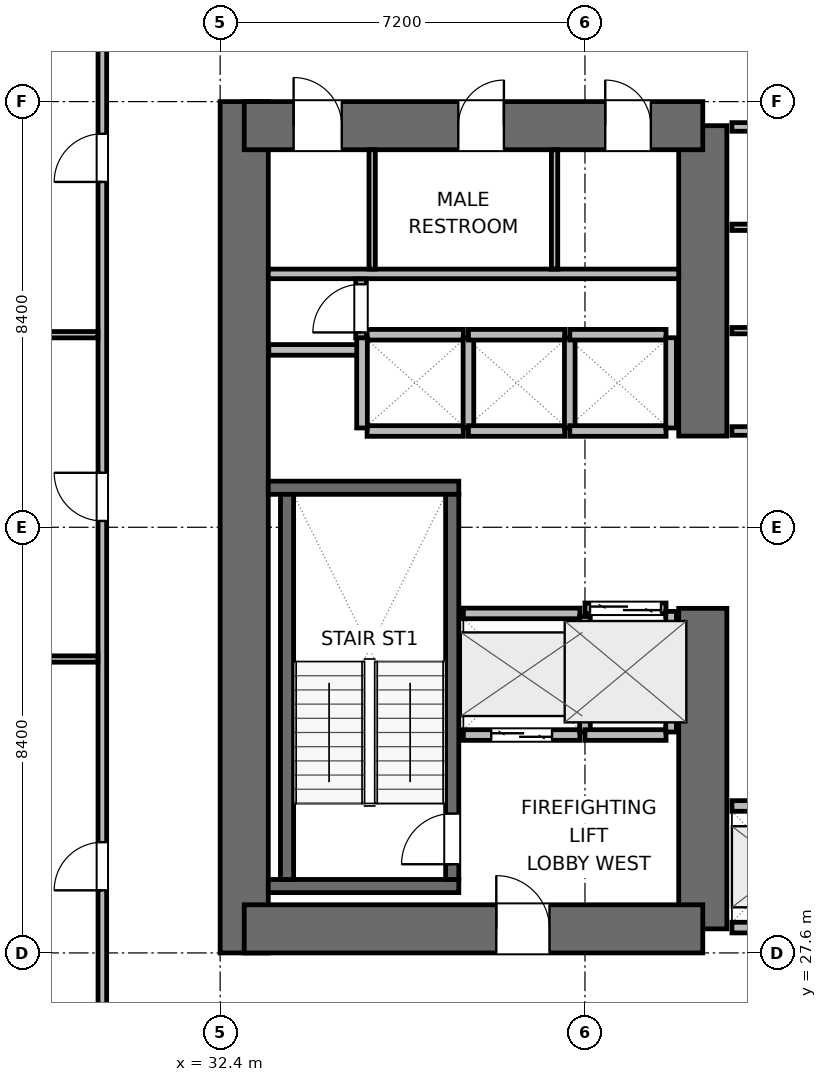
"""IFC4 building model, lengths in metres.
Left out: names, types, materials, properties, quantities, classifications, styles, units other than length and angle.
Written with IfcOpenShell. Run it as: python <this file> out.ifc"""

import sys

from ifc_helpers import new_model, si_unit, direction, frame, frame_2d, origin, place, context, subcontext, project, spatial, rectangle, extrude, element, fill, save


model = new_model("IFC4")
c1 = context("Model", 3, precision=1e-05, world=origin(), true_north=direction((0.0, 1.0)))
c2 = subcontext(c1, "Body", "Model", "MODEL_VIEW")
j1 = project(units=[si_unit("LENGTHUNIT", "METRE"), si_unit("PLANEANGLEUNIT", "RADIAN")], contexts=[c1])
p1 = place(None, origin())
s1 = spatial("IfcSite", under=j1, at=p1, CompositionType="ELEMENT")
p2 = place(p1, origin())
s2 = spatial("IfcBuilding", under=s1, at=p2, CompositionType="ELEMENT")
p3 = place(p2, frame((0.0, 0.0, 33.3)))
s3 = spatial("IfcBuildingStorey", under=s2, at=p3, CompositionType="ELEMENT", Elevation=33.3)
p4 = place(p3, frame((32.875, 27.6, 0.0), z_axis=(0.0, 0.0, 1.0), x_axis=(0.0, 1.0, 0.0)))
e1 = element("IfcWall", 1, at=p4, inside=s3, PredefinedType="SHEAR", context=c2, shape_type="SweptSolid", body=[
    extrude(rectangle(XDim=16.8, YDim=0.95, at=frame_2d((8.4, 0.0))), origin(), (0.0, 0.0, 1.0), 3.9),
])
p5 = place(p3, frame((41.925, 28.075, 0.0), z_axis=(0.0, 0.0, 1.0), x_axis=(0.0, 1.0, 0.0)))
e2 = element("IfcWall", 2, at=p5, inside=s3, PredefinedType="SHEAR", context=c2, shape_type="SweptSolid", body=[
    extrude(rectangle(XDim=6.325, YDim=0.95, at=frame_2d((3.163, 0.0))), origin(), (0.0, 0.0, 1.0), 3.9),
])
p6 = place(p3, frame((41.925, 37.8, 0.0), z_axis=(0.0, 0.0, 1.0), x_axis=(0.0, 1.0, 0.0)))
e3 = element("IfcWall", 3, at=p6, inside=s3, PredefinedType="SHEAR", context=c2, shape_type="SweptSolid", body=[
    extrude(rectangle(XDim=6.125, YDim=0.95, at=frame_2d((3.062, 0.0))), origin(), (0.0, 0.0, 1.0), 3.9),
])
p7 = place(p3, frame((32.875, 28.075, 0.0), z_axis=(0.0, 0.0, 1.0), x_axis=(1.0, 0.0, 0.0)))
e4 = element("IfcWall", 4, at=p7, inside=s3, PredefinedType="SHEAR", context=c2, shape_type="SweptSolid", body=[
    extrude(rectangle(XDim=9.05, YDim=0.95, at=frame_2d((4.525, 0.0))), origin(), (0.0, 0.0, 1.0), 3.9),
])
p8 = place(p7, frame((4.975, 0.0, 0.0)))
e5 = element("IfcOpeningElement", 5, at=p8, cuts=e4, PredefinedType="OPENING", context=c2, shape_type="SweptSolid", body=[
    extrude(rectangle(XDim=1.05, YDim=2.04, at=frame_2d((0.525, 1.02))), frame((0.0, 0.485, 0.0), z_axis=(0.0, -1.0, 0.0), x_axis=(1.0, 0.0, 0.0)), (0.0, 0.0, 1.0), 0.97),
])
p9 = place(p3, frame((32.875, 43.925, 0.0), z_axis=(0.0, 0.0, 1.0), x_axis=(1.0, 0.0, 0.0)))
e6 = element("IfcWall", 6, at=p9, inside=s3, PredefinedType="SHEAR", context=c2, shape_type="SweptSolid", body=[
    extrude(rectangle(XDim=9.05, YDim=0.95, at=frame_2d((4.525, 0.0))), origin(), (0.0, 0.0, 1.0), 3.9),
])
p10 = place(p9, frame((0.975, 0.0, 0.0)))
e7 = element("IfcOpeningElement", 7, at=p10, cuts=e6, PredefinedType="OPENING", context=c2, shape_type="SweptSolid", body=[
    extrude(rectangle(XDim=0.95, YDim=2.04, at=frame_2d((0.475, 1.02))), frame((0.0, 0.485, 0.0), z_axis=(0.0, -1.0, 0.0), x_axis=(1.0, 0.0, 0.0)), (0.0, 0.0, 1.0), 0.97),
])
p11 = place(p9, frame((4.225, 0.0, 0.0)))
e8 = element("IfcOpeningElement", 8, at=p11, cuts=e6, PredefinedType="OPENING", context=c2, shape_type="SweptSolid", body=[
    extrude(rectangle(XDim=0.9, YDim=2.02, at=frame_2d((0.45, 1.01))), frame((0.0, 0.485, 0.0), z_axis=(0.0, -1.0, 0.0), x_axis=(1.0, 0.0, 0.0)), (0.0, 0.0, 1.0), 0.97),
])
p12 = place(p9, frame((7.125, 0.0, 0.0)))
e9 = element("IfcOpeningElement", 9, at=p12, cuts=e6, PredefinedType="OPENING", context=c2, shape_type="SweptSolid", body=[
    extrude(rectangle(XDim=0.9, YDim=2.02, at=frame_2d((0.45, 1.01))), frame((0.0, 0.485, 0.0), z_axis=(0.0, -1.0, 0.0), x_axis=(1.0, 0.0, 0.0)), (0.0, 0.0, 1.0), 0.97),
])
for number, where, z_axis, x_axis in (
    (10, (33.35, 28.92, 0.0), (0.0, 0.0, 1.0), (1.0, 0.0, 0.0)),
    (11, (33.35, 36.78, 0.0), (0.0, 0.0, 1.0), (1.0, 0.0, 0.0)),
):
    element("IfcWall", number, at=place(p3, frame(where, z_axis=z_axis, x_axis=x_axis)), inside=s3, PredefinedType="SHEAR", context=c2, shape_type="SweptSolid", body=[
        extrude(rectangle(XDim=3.76, YDim=0.26, at=frame_2d((1.88, 0.0))), origin(), (0.0, 0.0, 1.0), 3.9),
    ])
p13 = place(p3, frame((33.72, 29.05, 0.0), z_axis=(0.0, 0.0, 1.0), x_axis=(0.0, 1.0, 0.0)))
e12 = element("IfcWall", 12, at=p13, inside=s3, PredefinedType="SHEAR", context=c2, shape_type="SweptSolid", body=[
    extrude(rectangle(XDim=7.6, YDim=0.26, at=frame_2d((3.8, 0.0))), origin(), (0.0, 0.0, 1.0), 3.9),
])
p14 = place(p3, frame((36.98, 29.05, 0.0), z_axis=(0.0, 0.0, 1.0), x_axis=(0.0, 1.0, 0.0)))
e13 = element("IfcWall", 13, at=p14, inside=s3, PredefinedType="SHEAR", context=c2, shape_type="SweptSolid", body=[
    extrude(rectangle(XDim=7.6, YDim=0.26, at=frame_2d((3.8, 0.0))), origin(), (0.0, 0.0, 1.0), 3.9),
])
p15 = place(p14, frame((0.3, 0.0, 0.0)))
e14 = element("IfcOpeningElement", 14, at=p15, cuts=e13, PredefinedType="OPENING", context=c2, shape_type="SweptSolid", body=[
    extrude(rectangle(XDim=1.0, YDim=2.04, at=frame_2d((0.5, 1.02))), frame((0.0, 0.14, 0.0), z_axis=(0.0, -1.0, 0.0), x_axis=(1.0, 0.0, 0.0)), (0.0, 0.0, 1.0), 0.28),
])
p16 = place(p3, frame((33.35, 41.0, 0.0), z_axis=(0.0, 0.0, 1.0), x_axis=(1.0, 0.0, 0.0)))
e15 = element("IfcWall", 15, at=p16, inside=s3, PredefinedType="PLUMBINGWALL", context=c2, shape_type="SweptSolid", body=[
    extrude(rectangle(XDim=8.1, YDim=0.19, at=frame_2d((4.05, 0.0))), origin(), (0.0, 0.0, 1.0), 3.64),
])
for number, where, z_axis, x_axis in (
    (16, (35.4, 41.095, 0.0), (0.0, 0.0, 1.0), (0.0, 1.0, 0.0)),
    (17, (39.0, 41.095, 0.0), (0.0, 0.0, 1.0), (0.0, 1.0, 0.0)),
):
    element("IfcWall", number, at=place(p3, frame(where, z_axis=z_axis, x_axis=x_axis)), inside=s3, PredefinedType="PARTITIONING", context=c2, shape_type="SweptSolid", body=[
        extrude(rectangle(XDim=2.355, YDim=0.125, at=frame_2d((1.177, 0.0))), origin(), (0.0, 0.0, 1.0), 3.64),
    ])
p17 = place(p3, frame((33.36, 39.5, 0.0), z_axis=(0.0, 0.0, 1.0), x_axis=(1.0, 0.0, 0.0)))
e18 = element("IfcWall", 18, at=p17, inside=s3, PredefinedType="PARTITIONING", context=c2, shape_type="SweptSolid", body=[
    extrude(rectangle(XDim=1.86, YDim=0.21, at=frame_2d((0.93, 0.0))), origin(), (0.0, 0.0, 1.0), 3.64),
])
p18 = place(p3, frame((37.2, 31.9, 0.0), z_axis=(0.0, 0.0, 1.0), x_axis=(1.0, 0.0, 0.0)))
e19 = element("IfcWall", 19, at=p18, inside=s3, PredefinedType="PARTITIONING", context=c2, shape_type="SweptSolid", body=[
    extrude(rectangle(XDim=2.3, YDim=0.21, at=frame_2d((1.15, 0.0))), origin(), (0.0, 0.0, 1.0), 3.64),
])
p19 = place(p18, frame((0.55, 0.0, 0.0)))
e20 = element("IfcOpeningElement", 20, at=p19, cuts=e19, PredefinedType="OPENING", context=c2, shape_type="SweptSolid", body=[
    extrude(rectangle(XDim=1.2, YDim=2.04, at=frame_2d((0.6, 1.02))), frame((0.0, 0.115, 0.0), z_axis=(0.0, -1.0, 0.0), x_axis=(1.0, 0.0, 0.0)), (0.0, 0.0, 1.0), 0.23),
])
p20 = place(p3, frame((37.2, 34.3, 0.0), z_axis=(0.0, 0.0, 1.0), x_axis=(1.0, 0.0, 0.0)))
e21 = element("IfcWall", 21, at=p20, inside=s3, PredefinedType="PARTITIONING", context=c2, shape_type="SweptSolid", body=[
    extrude(rectangle(XDim=2.3, YDim=0.21, at=frame_2d((1.15, 0.0))), origin(), (0.0, 0.0, 1.0), 3.64),
])
p21 = place(p3, frame((39.6, 31.96, 0.0), z_axis=(0.0, 0.0, 1.0), x_axis=(0.0, 1.0, 0.0)))
e22 = element("IfcWall", 22, at=p21, inside=s3, PredefinedType="PARTITIONING", context=c2, shape_type="SweptSolid", body=[
    extrude(rectangle(XDim=2.28, YDim=0.21, at=frame_2d((1.14, 0.0))), origin(), (0.0, 0.0, 1.0), 3.64),
])
p22 = place(p3, frame((39.6, 34.4, 0.0), z_axis=(0.0, 0.0, 1.0), x_axis=(1.0, 0.0, 0.0)))
e23 = element("IfcWall", 23, at=p22, inside=s3, PredefinedType="PARTITIONING", context=c2, shape_type="SweptSolid", body=[
    extrude(rectangle(XDim=1.6, YDim=0.21, at=frame_2d((0.8, 0.0))), origin(), (0.0, 0.0, 1.0), 3.64),
])
p23 = place(p22, frame((0.1, 0.0, 0.0)))
e24 = element("IfcOpeningElement", 24, at=p23, cuts=e23, PredefinedType="OPENING", context=c2, shape_type="SweptSolid", body=[
    extrude(rectangle(XDim=1.4, YDim=2.06, at=frame_2d((0.7, 1.03))), frame((0.0, 0.115, 0.0), z_axis=(0.0, -1.0, 0.0), x_axis=(1.0, 0.0, 0.0)), (0.0, 0.0, 1.0), 0.23),
])
p24 = place(p3, frame((39.6, 31.9, 0.0), z_axis=(0.0, 0.0, 1.0), x_axis=(1.0, 0.0, 0.0)))
e25 = element("IfcWall", 25, at=p24, inside=s3, PredefinedType="PARTITIONING", context=c2, shape_type="SweptSolid", body=[
    extrude(rectangle(XDim=1.6, YDim=0.21, at=frame_2d((0.8, 0.0))), origin(), (0.0, 0.0, 1.0), 3.64),
])
p25 = place(p3, frame((41.3, 31.96, 0.0), z_axis=(0.0, 0.0, 1.0), x_axis=(0.0, 1.0, 0.0)))
e26 = element("IfcWall", 26, at=p25, inside=s3, PredefinedType="PARTITIONING", context=c2, shape_type="SweptSolid", body=[
    extrude(rectangle(XDim=2.38, YDim=0.21, at=frame_2d((1.19, 0.0))), origin(), (0.0, 0.0, 1.0), 3.64),
])
p26 = place(p3, frame((42.5, 30.5, 0.0), z_axis=(0.0, 0.0, 1.0), x_axis=(1.0, 0.0, 0.0)))
e27 = element("IfcWall", 27, at=p26, inside=s3, PredefinedType="PARTITIONING", context=c2, shape_type="SweptSolid", body=[
    extrude(rectangle(XDim=2.1, YDim=0.21, at=frame_2d((1.05, 0.0))), origin(), (0.0, 0.0, 1.0), 3.64),
])
p27 = place(p26, frame((0.5, 0.0, 0.0)))
e28 = element("IfcOpeningElement", 28, at=p27, cuts=e27, PredefinedType="OPENING", context=c2, shape_type="SweptSolid", body=[
    extrude(rectangle(XDim=1.1, YDim=2.04, at=frame_2d((0.55, 1.02))), frame((0.0, 0.115, 0.0), z_axis=(0.0, -1.0, 0.0), x_axis=(1.0, 0.0, 0.0)), (0.0, 0.0, 1.0), 0.23),
])
p28 = place(p3, frame((42.5, 28.1, 0.0), z_axis=(0.0, 0.0, 1.0), x_axis=(1.0, 0.0, 0.0)))
e29 = element("IfcWall", 29, at=p28, inside=s3, PredefinedType="PARTITIONING", context=c2, shape_type="SweptSolid", body=[
    extrude(rectangle(XDim=2.1, YDim=0.21, at=frame_2d((1.05, 0.0))), origin(), (0.0, 0.0, 1.0), 2.525),
])
for number, where, z_axis, x_axis in (
    (30, (35.3, 37.9, 0.0), (0.0, 0.0, 1.0), (1.0, 0.0, 0.0)),
    (31, (35.3, 39.8, 0.0), (0.0, 0.0, 1.0), (1.0, 0.0, 0.0)),
):
    element("IfcWall", number, at=place(p3, frame(where, z_axis=z_axis, x_axis=x_axis)), inside=s3, PredefinedType="PARTITIONING", context=c2, shape_type="SweptSolid", body=[
        extrude(rectangle(XDim=1.9, YDim=0.21, at=frame_2d((0.95, 0.0))), origin(), (0.0, 0.0, 1.0), 3.64),
    ])
for number, where, z_axis, x_axis in (
    (32, (35.2, 37.96, 0.0), (0.0, 0.0, 1.0), (0.0, 1.0, 0.0)),
    (33, (37.3, 37.96, 0.0), (0.0, 0.0, 1.0), (0.0, 1.0, 0.0)),
):
    element("IfcWall", number, at=place(p3, frame(where, z_axis=z_axis, x_axis=x_axis)), inside=s3, PredefinedType="PARTITIONING", context=c2, shape_type="SweptSolid", body=[
        extrude(rectangle(XDim=1.78, YDim=0.21, at=frame_2d((0.89, 0.0))), origin(), (0.0, 0.0, 1.0), 3.64),
    ])
for number, where, z_axis, x_axis in (
    (34, (37.3, 37.9, 0.0), (0.0, 0.0, 1.0), (1.0, 0.0, 0.0)),
    (35, (37.3, 39.8, 0.0), (0.0, 0.0, 1.0), (1.0, 0.0, 0.0)),
):
    element("IfcWall", number, at=place(p3, frame(where, z_axis=z_axis, x_axis=x_axis)), inside=s3, PredefinedType="PARTITIONING", context=c2, shape_type="SweptSolid", body=[
        extrude(rectangle(XDim=1.9, YDim=0.21, at=frame_2d((0.95, 0.0))), origin(), (0.0, 0.0, 1.0), 3.64),
    ])
p29 = place(p3, frame((39.3, 37.96, 0.0), z_axis=(0.0, 0.0, 1.0), x_axis=(0.0, 1.0, 0.0)))
e36 = element("IfcWall", 36, at=p29, inside=s3, PredefinedType="PARTITIONING", context=c2, shape_type="SweptSolid", body=[
    extrude(rectangle(XDim=1.78, YDim=0.21, at=frame_2d((0.89, 0.0))), origin(), (0.0, 0.0, 1.0), 3.64),
])
for number, where, z_axis, x_axis in (
    (37, (39.3, 37.9, 0.0), (0.0, 0.0, 1.0), (1.0, 0.0, 0.0)),
    (38, (39.3, 39.8, 0.0), (0.0, 0.0, 1.0), (1.0, 0.0, 0.0)),
):
    element("IfcWall", number, at=place(p3, frame(where, z_axis=z_axis, x_axis=x_axis)), inside=s3, PredefinedType="PARTITIONING", context=c2, shape_type="SweptSolid", body=[
        extrude(rectangle(XDim=1.9, YDim=0.21, at=frame_2d((0.95, 0.0))), origin(), (0.0, 0.0, 1.0), 3.64),
    ])
p30 = place(p3, frame((41.3, 37.96, 0.0), z_axis=(0.0, 0.0, 1.0), x_axis=(0.0, 1.0, 0.0)))
e39 = element("IfcWall", 39, at=p30, inside=s3, PredefinedType="PARTITIONING", context=c2, shape_type="SweptSolid", body=[
    extrude(rectangle(XDim=1.78, YDim=0.21, at=frame_2d((0.89, 0.0))), origin(), (0.0, 0.0, 1.0), 3.64),
])
p31 = place(p3, frame((35.18, 39.74, 0.0), z_axis=(0.0, 0.0, 1.0), x_axis=(0.0, 1.0, 0.0)))
e40 = element("IfcWall", 40, at=p31, inside=s3, PredefinedType="PARTITIONING", context=c2, shape_type="SweptSolid", body=[
    extrude(rectangle(XDim=1.16, YDim=0.21, at=frame_2d((0.58, 0.0))), origin(), (0.0, 0.0, 1.0), 3.64),
])
p32 = place(p31, frame((0.105, 0.0, 0.0)))
e41 = element("IfcOpeningElement", 41, at=p32, cuts=e40, PredefinedType="OPENING", context=c2, shape_type="SweptSolid", body=[
    extrude(rectangle(XDim=0.95, YDim=2.04, at=frame_2d((0.475, 1.02))), frame((0.0, 0.115, 0.0), z_axis=(0.0, -1.0, 0.0), x_axis=(1.0, 0.0, 0.0)), (0.0, 0.0, 1.0), 0.23),
])
p33 = place(p3, frame((42.5, 37.9, 0.0), z_axis=(0.0, 0.0, 1.0), x_axis=(1.0, 0.0, 0.0)))
e42 = element("IfcWall", 42, at=p33, inside=s3, PredefinedType="PARTITIONING", context=c2, shape_type="SweptSolid", body=[
    extrude(rectangle(XDim=4.213, YDim=0.17, at=frame_2d((2.106, 0.0))), origin(), (0.0, 0.0, 1.0), 3.64),
])
p34 = place(p3, frame((42.5, 43.9, 0.0), z_axis=(0.0, 0.0, 1.0), x_axis=(1.0, 0.0, 0.0)))
e43 = element("IfcWall", 43, at=p34, inside=s3, PredefinedType="PARTITIONING", context=c2, shape_type="SweptSolid", body=[
    extrude(rectangle(XDim=4.213, YDim=0.17, at=frame_2d((2.106, 0.0))), origin(), (0.0, 0.0, 1.0), 2.525),
])
for number, where, z_axis, x_axis in (
    (44, (42.5, 39.88, 0.0), (0.0, 0.0, 1.0), (1.0, 0.0, 0.0)),
    (45, (42.5, 41.92, 0.0), (0.0, 0.0, 1.0), (1.0, 0.0, 0.0)),
):
    element("IfcWall", number, at=place(p3, frame(where, z_axis=z_axis, x_axis=x_axis)), inside=s3, PredefinedType="PARTITIONING", context=c2, shape_type="SweptSolid", body=[
        extrude(rectangle(XDim=4.213, YDim=0.125, at=frame_2d((2.106, 0.0))), origin(), (0.0, 0.0, 1.0), 3.64),
    ])
p35 = place(p3, frame((30.075, 25.307, 0.0), z_axis=(0.0, 0.0, 1.0), x_axis=(0.0, 1.0, 0.0)))
e46 = element("IfcWall", 46, at=p35, inside=s3, PredefinedType="PARTITIONING", context=c2, shape_type="SweptSolid", body=[
    extrude(rectangle(XDim=21.386, YDim=0.17, at=frame_2d((10.693, 0.0))), origin(), (0.0, 0.0, 1.0), 3.64),
])
p36 = place(p35, frame((3.528, 0.0, 0.0)))
e47 = element("IfcOpeningElement", 47, at=p36, cuts=e46, PredefinedType="OPENING", context=c2, shape_type="SweptSolid", body=[
    extrude(rectangle(XDim=0.95, YDim=2.04, at=frame_2d((0.475, 1.02))), frame((0.0, 0.095, 0.0), z_axis=(0.0, -1.0, 0.0), x_axis=(1.0, 0.0, 0.0)), (0.0, 0.0, 1.0), 0.19),
])
p37 = place(p35, frame((10.818, 0.0, 0.0)))
e48 = element("IfcOpeningElement", 48, at=p37, cuts=e46, PredefinedType="OPENING", context=c2, shape_type="SweptSolid", body=[
    extrude(rectangle(XDim=0.95, YDim=2.04, at=frame_2d((0.475, 1.02))), frame((0.0, 0.095, 0.0), z_axis=(0.0, -1.0, 0.0), x_axis=(1.0, 0.0, 0.0)), (0.0, 0.0, 1.0), 0.19),
])
p38 = place(p35, frame((17.508, 0.0, 0.0)))
e49 = element("IfcOpeningElement", 49, at=p38, cuts=e46, PredefinedType="OPENING", context=c2, shape_type="SweptSolid", body=[
    extrude(rectangle(XDim=0.95, YDim=2.04, at=frame_2d((0.475, 1.02))), frame((0.0, 0.095, 0.0), z_axis=(0.0, -1.0, 0.0), x_axis=(1.0, 0.0, 0.0)), (0.0, 0.0, 1.0), 0.19),
])
p39 = place(p3, frame((20.375, 33.4, 0.0), z_axis=(0.0, 0.0, 1.0), x_axis=(1.0, 0.0, 0.0)))
e50 = element("IfcWall", 50, at=p39, inside=s3, PredefinedType="PARTITIONING", context=c2, shape_type="SweptSolid", body=[
    extrude(rectangle(XDim=9.613, YDim=0.125, at=frame_2d((4.807, 0.0))), origin(), (0.0, 0.0, 1.0), 3.64),
])
p40 = place(p3, frame((18.245, 39.8, 0.0), z_axis=(0.0, 0.0, 1.0), x_axis=(1.0, 0.0, 0.0)))
e51 = element("IfcWall", 51, at=p40, inside=s3, PredefinedType="PARTITIONING", context=c2, shape_type="SweptSolid", body=[
    extrude(rectangle(XDim=11.743, YDim=0.125, at=frame_2d((5.872, 0.0))), origin(), (0.0, 0.0, 1.0), 3.64),
])
p41 = place(p15, origin())
e52 = element("IfcDoor", 52, at=p41, inside=s3, OperationType="SINGLE_SWING_LEFT", PredefinedType="DOOR", context=c2, shape_type="SweptSolid", body=[
    extrude(rectangle(XDim=1.0, YDim=2.04, at=frame_2d((0.5, 1.02))), frame((0.0, 0.025, 0.0), z_axis=(0.0, -1.0, 0.0), x_axis=(1.0, 0.0, 0.0)), (0.0, 0.0, 1.0), 0.05),
])
fill(e14, e52)
p42 = place(p19, origin())
e53 = element("IfcDoor", 53, at=p42, inside=s3, OperationType="DOUBLE_DOOR_SLIDING", PredefinedType="DOOR", context=c2, shape_type="SweptSolid", body=[
    extrude(rectangle(XDim=1.2, YDim=2.04, at=frame_2d((0.6, 1.02))), frame((0.0, 0.025, 0.0), z_axis=(0.0, -1.0, 0.0), x_axis=(1.0, 0.0, 0.0)), (0.0, 0.0, 1.0), 0.05),
])
fill(e20, e53)
p43 = place(p23, origin())
e54 = element("IfcDoor", 54, at=p43, inside=s3, OperationType="DOUBLE_DOOR_SLIDING", PredefinedType="DOOR", context=c2, shape_type="SweptSolid", body=[
    extrude(rectangle(XDim=1.4, YDim=2.06, at=frame_2d((0.7, 1.03))), frame((0.0, 0.025, 0.0), z_axis=(0.0, -1.0, 0.0), x_axis=(1.0, 0.0, 0.0)), (0.0, 0.0, 1.0), 0.05),
])
fill(e24, e54)
p44 = place(p8, origin())
e55 = element("IfcDoor", 55, at=p44, inside=s3, OperationType="SINGLE_SWING_LEFT", PredefinedType="DOOR", context=c2, shape_type="SweptSolid", body=[
    extrude(rectangle(XDim=1.05, YDim=2.04, at=frame_2d((0.525, 1.02))), frame((0.0, 0.025, 0.0), z_axis=(0.0, -1.0, 0.0), x_axis=(1.0, 0.0, 0.0)), (0.0, 0.0, 1.0), 0.05),
])
fill(e5, e55)
p45 = place(p10, origin())
e56 = element("IfcDoor", 56, at=p45, inside=s3, OperationType="SINGLE_SWING_LEFT", PredefinedType="DOOR", context=c2, shape_type="SweptSolid", body=[
    extrude(rectangle(XDim=0.95, YDim=2.04, at=frame_2d((0.475, 1.02))), frame((0.0, 0.025, 0.0), z_axis=(0.0, -1.0, 0.0), x_axis=(1.0, 0.0, 0.0)), (0.0, 0.0, 1.0), 0.05),
])
fill(e7, e56)
p46 = place(p11, origin())
e57 = element("IfcDoor", 57, at=p46, inside=s3, OperationType="SINGLE_SWING_RIGHT", PredefinedType="DOOR", context=c2, shape_type="SweptSolid", body=[
    extrude(rectangle(XDim=0.9, YDim=2.02, at=frame_2d((0.45, 1.01))), frame((0.0, 0.025, 0.0), z_axis=(0.0, -1.0, 0.0), x_axis=(1.0, 0.0, 0.0)), (0.0, 0.0, 1.0), 0.05),
])
fill(e8, e57)
p47 = place(p12, origin())
e58 = element("IfcDoor", 58, at=p47, inside=s3, OperationType="SINGLE_SWING_LEFT", PredefinedType="DOOR", context=c2, shape_type="SweptSolid", body=[
    extrude(rectangle(XDim=0.9, YDim=2.02, at=frame_2d((0.45, 1.01))), frame((0.0, 0.025, 0.0), z_axis=(0.0, -1.0, 0.0), x_axis=(1.0, 0.0, 0.0)), (0.0, 0.0, 1.0), 0.05),
])
fill(e9, e58)
p48 = place(p32, origin())
e59 = element("IfcDoor", 59, at=p48, inside=s3, OperationType="SINGLE_SWING_LEFT", PredefinedType="DOOR", context=c2, shape_type="SweptSolid", body=[
    extrude(rectangle(XDim=0.95, YDim=2.04, at=frame_2d((0.475, 1.02))), frame((0.0, 0.025, 0.0), z_axis=(0.0, -1.0, 0.0), x_axis=(1.0, 0.0, 0.0)), (0.0, 0.0, 1.0), 0.05),
])
fill(e41, e59)
p49 = place(p36, origin())
e60 = element("IfcDoor", 60, at=p49, inside=s3, OperationType="SINGLE_SWING_LEFT", PredefinedType="DOOR", context=c2, shape_type="SweptSolid", body=[
    extrude(rectangle(XDim=0.95, YDim=2.04, at=frame_2d((0.475, 1.02))), frame((0.0, 0.025, 0.0), z_axis=(0.0, -1.0, 0.0), x_axis=(1.0, 0.0, 0.0)), (0.0, 0.0, 1.0), 0.05),
])
fill(e47, e60)
p50 = place(p37, origin())
e61 = element("IfcDoor", 61, at=p50, inside=s3, OperationType="SINGLE_SWING_RIGHT", PredefinedType="DOOR", context=c2, shape_type="SweptSolid", body=[
    extrude(rectangle(XDim=0.95, YDim=2.04, at=frame_2d((0.475, 1.02))), frame((0.0, 0.025, 0.0), z_axis=(0.0, -1.0, 0.0), x_axis=(1.0, 0.0, 0.0)), (0.0, 0.0, 1.0), 0.05),
])
fill(e48, e61)
p51 = place(p38, origin())
e62 = element("IfcDoor", 62, at=p51, inside=s3, OperationType="SINGLE_SWING_LEFT", PredefinedType="DOOR", context=c2, shape_type="SweptSolid", body=[
    extrude(rectangle(XDim=0.95, YDim=2.04, at=frame_2d((0.475, 1.02))), frame((0.0, 0.025, 0.0), z_axis=(0.0, -1.0, 0.0), x_axis=(1.0, 0.0, 0.0)), (0.0, 0.0, 1.0), 0.05),
])
fill(e49, e62)
save(model, sys.argv[1])
